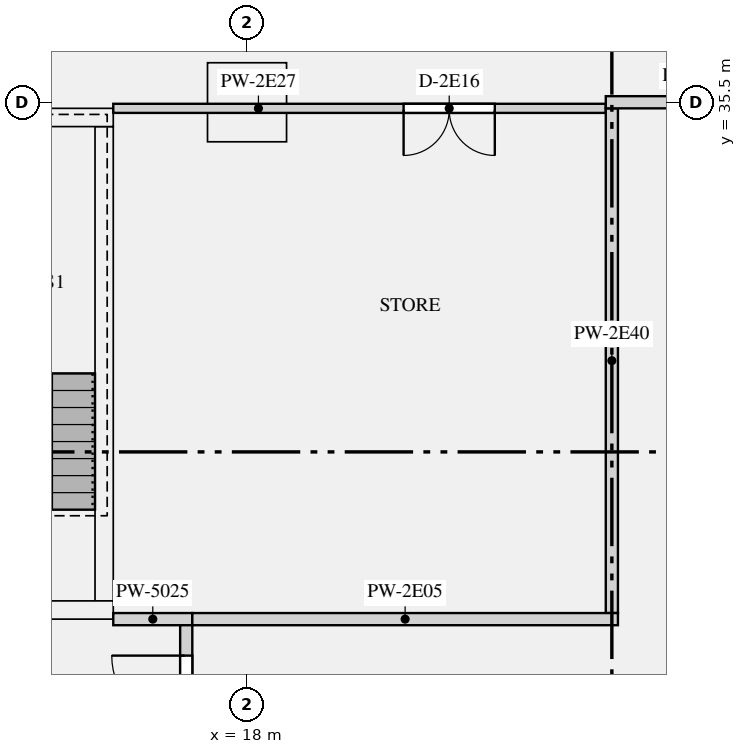
"""IFC4 building model, lengths in metres.
Left out: names, types, materials, properties, quantities, classifications, styles, units other than length and angle.
Written with IfcOpenShell. Run it as: python <this file> out.ifc"""

import sys

from ifc_helpers import new_model, si_unit, direction, frame, frame_2d, origin, origin_2d, place, context, subcontext, project, spatial, rectangle, extrude, element, fill, save


model = new_model("IFC4")
c1 = context("Model", 3, precision=1e-05, world=origin(), true_north=direction((0.0, 1.0)))
c2 = subcontext(c1, "Body", "Model", "MODEL_VIEW")
j1 = project(units=[si_unit("LENGTHUNIT", "METRE"), si_unit("PLANEANGLEUNIT", "RADIAN")], contexts=[c1])
p1 = place(None, origin())
s1 = spatial("IfcSite", under=j1, at=p1, CompositionType="ELEMENT")
p2 = place(p1, origin())
s2 = spatial("IfcBuilding", under=s1, at=p2, CompositionType="ELEMENT")
p3 = place(p2, frame((0.0, 0.0, 118.2)))
s3 = spatial("IfcBuildingStorey", under=s2, at=p3, CompositionType="ELEMENT", Elevation=118.2)
p4 = place(p3, frame((18.0, 35.5, 0.0), z_axis=(0.0, 0.0, 1.0), x_axis=(1.0, 0.0, 0.0)))
e1 = element("IfcColumn", 1, at=p4, inside=s3, PredefinedType="COLUMN", context=c2, shape_type="SweptSolid", body=[
    extrude(rectangle(XDim=1.3, YDim=1.3, at=origin_2d()), origin(), (0.0, 0.0, 1.0), 3.15),
])
p5 = place(p3, frame((12.2, 27.15, 0.0), z_axis=(0.0, 0.0, 1.0), x_axis=(1.0, 0.0, 0.0)))
e2 = element("IfcWall", 2, at=p5, inside=s3, PredefinedType="SHEAR", context=c2, shape_type="SweptSolid", body=[
    extrude(rectangle(XDim=3.6, YDim=0.3, at=frame_2d((1.8, 0.0))), origin(), (0.0, 0.0, 1.0), 3.15),
])
p6 = place(p5, frame((1.25, 0.0, 0.0)))
e3 = element("IfcOpeningElement", 3, at=p6, cuts=e2, PredefinedType="OPENING", context=c2, shape_type="SweptSolid", body=[
    extrude(rectangle(XDim=1.1, YDim=2.1, at=frame_2d((0.55, 1.05))), frame((0.0, 0.16, 0.0), z_axis=(0.0, -1.0, 0.0), x_axis=(1.0, 0.0, 0.0)), (0.0, 0.0, 1.0), 0.32),
])
p7 = place(p3, frame((12.2, 35.25, 0.0), z_axis=(0.0, 0.0, 1.0), x_axis=(1.0, 0.0, 0.0)))
e4 = element("IfcWall", 4, at=p7, inside=s3, PredefinedType="SHEAR", context=c2, shape_type="SweptSolid", body=[
    extrude(rectangle(XDim=3.6, YDim=0.3, at=frame_2d((1.8, 0.0))), origin(), (0.0, 0.0, 1.0), 3.15),
])
p8 = place(p3, frame((15.65, 27.3, 0.0), z_axis=(0.0, 0.0, 1.0), x_axis=(0.0, 1.0, 0.0)))
e5 = element("IfcWall", 5, at=p8, inside=s3, PredefinedType="SHEAR", context=c2, shape_type="SweptSolid", body=[
    extrude(rectangle(XDim=7.8, YDim=0.3, at=frame_2d((3.9, 0.0))), origin(), (0.0, 0.0, 1.0), 3.15),
])
p9 = place(p3, frame((15.8, 27.0, 0.0), z_axis=(0.0, 0.0, 1.0), x_axis=(1.0, 0.0, 0.0)))
e6 = element("IfcWall", 6, at=p9, inside=s3, PredefinedType="PARTITIONING", context=c2, shape_type="SweptSolid", body=[
    extrude(rectangle(XDim=1.3, YDim=0.2, at=frame_2d((0.65, 0.0))), origin(), (0.0, 0.0, 1.0), 2.83),
])
p10 = place(p3, frame((17.0, 23.1, 0.0), z_axis=(0.0, 0.0, 1.0), x_axis=(0.0, 1.0, 0.0)))
e7 = element("IfcWall", 7, at=p10, inside=s3, PredefinedType="PARTITIONING", context=c2, shape_type="SweptSolid", body=[
    extrude(rectangle(XDim=3.8, YDim=0.2, at=frame_2d((1.9, 0.0))), origin(), (0.0, 0.0, 1.0), 2.83),
])
p11 = place(p10, frame((2.1, 0.0, 0.0)))
e8 = element("IfcOpeningElement", 8, at=p11, cuts=e7, PredefinedType="OPENING", context=c2, shape_type="SweptSolid", body=[
    extrude(rectangle(XDim=1.2, YDim=2.1, at=frame_2d((0.6, 1.05))), frame((0.0, 0.11, 0.0), z_axis=(0.0, -1.0, 0.0), x_axis=(1.0, 0.0, 0.0)), (0.0, 0.0, 1.0), 0.22),
])
p12 = place(p3, frame((17.1, 27.0, 0.0), z_axis=(0.0, 0.0, 1.0), x_axis=(1.0, 0.0, 0.0)))
e9 = element("IfcWall", 9, at=p12, inside=s3, PredefinedType="PARTITIONING", context=c2, shape_type="SweptSolid", body=[
    extrude(rectangle(XDim=7.0, YDim=0.2, at=frame_2d((3.5, 0.0))), origin(), (0.0, 0.0, 1.0), 2.83),
])
p13 = place(p3, frame((23.9, 35.5, 0.0), z_axis=(0.0, 0.0, 1.0), x_axis=(1.0, 0.0, 0.0)))
e10 = element("IfcWall", 10, at=p13, inside=s3, PredefinedType="PARTITIONING", context=c2, shape_type="SweptSolid", body=[
    extrude(rectangle(XDim=3.1, YDim=0.2, at=frame_2d((1.55, 0.0))), origin(), (0.0, 0.0, 1.0), 2.83),
])
p14 = place(p3, frame((15.8, 35.4, 0.0), z_axis=(0.0, 0.0, 1.0), x_axis=(1.0, 0.0, 0.0)))
e11 = element("IfcWall", 11, at=p14, inside=s3, PredefinedType="PARTITIONING", context=c2, shape_type="SweptSolid", body=[
    extrude(rectangle(XDim=8.1, YDim=0.15, at=frame_2d((4.05, 0.0))), origin(), (0.0, 0.0, 1.0), 2.83),
])
p15 = place(p14, frame((4.775, 0.0, 0.0)))
e12 = element("IfcOpeningElement", 12, at=p15, cuts=e11, PredefinedType="OPENING", context=c2, shape_type="SweptSolid", body=[
    extrude(rectangle(XDim=1.5, YDim=2.1, at=frame_2d((0.75, 1.05))), frame((0.0, 0.085, 0.0), z_axis=(0.0, -1.0, 0.0), x_axis=(1.0, 0.0, 0.0)), (0.0, 0.0, 1.0), 0.17),
])
p16 = place(p3, frame((24.0, 27.1, 0.0), z_axis=(0.0, 0.0, 1.0), x_axis=(0.0, 1.0, 0.0)))
e13 = element("IfcWall", 13, at=p16, inside=s3, PredefinedType="PARTITIONING", context=c2, shape_type="SweptSolid", body=[
    extrude(rectangle(XDim=8.3, YDim=0.2, at=frame_2d((4.15, 0.0))), origin(), (0.0, 0.0, 1.0), 2.83),
])
p17 = place(p11, origin())
e14 = element("IfcDoor", 14, at=p17, inside=s3, OperationType="SINGLE_SWING_RIGHT", PredefinedType="DOOR", context=c2, shape_type="SweptSolid", body=[
    extrude(rectangle(XDim=1.2, YDim=2.1, at=frame_2d((0.6, 1.05))), frame((0.0, 0.025, 0.0), z_axis=(0.0, -1.0, 0.0), x_axis=(1.0, 0.0, 0.0)), (0.0, 0.0, 1.0), 0.05),
])
fill(e8, e14)
p18 = place(p15, frame((1.5, 0.0, 0.0), z_axis=(0.0, 0.0, 1.0), x_axis=(-1.0, 0.0, 0.0)))
e15 = element("IfcDoor", 15, at=p18, inside=s3, OperationType="DOUBLE_DOOR_SINGLE_SWING", PredefinedType="DOOR", context=c2, shape_type="SweptSolid", body=[
    extrude(rectangle(XDim=1.5, YDim=2.1, at=frame_2d((0.75, 1.05))), frame((0.0, 0.025, 0.0), z_axis=(0.0, -1.0, 0.0), x_axis=(1.0, 0.0, 0.0)), (0.0, 0.0, 1.0), 0.05),
])
fill(e12, e15)
save(model, sys.argv[1])
